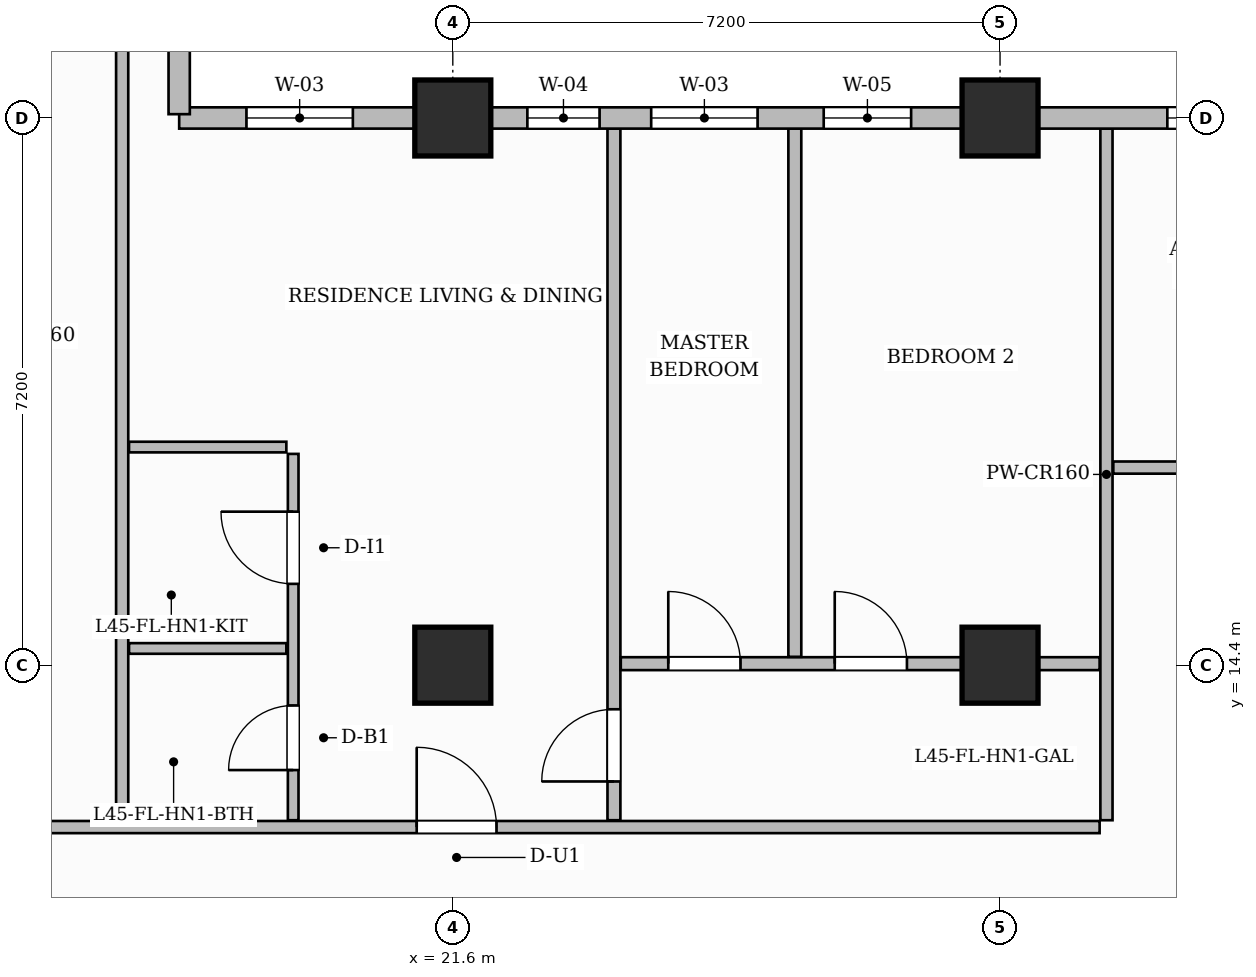
"""IFC4 building model, lengths in metres.
Left out: names, types, materials, properties, quantities, classifications, styles, units other than length and angle.
Written with IfcOpenShell. Run it as: python <this file> out.ifc"""

import sys

from ifc_helpers import new_model, si_unit, direction, frame, frame_2d, origin, origin_2d, place, context, subcontext, project, spatial, rectangle, extrude, source, transform, mapped, element, fill, save


model = new_model("IFC4")
c1 = context("Model", 3, precision=1e-05, world=origin(), true_north=direction((0.0, 1.0)))
c2 = subcontext(c1, "Body", "Model", "MODEL_VIEW")
j1 = project(units=[si_unit("LENGTHUNIT", "METRE"), si_unit("PLANEANGLEUNIT", "RADIAN")], contexts=[c1])
p1 = place(None, origin())
s1 = spatial("IfcSite", under=j1, at=p1, CompositionType="ELEMENT")
p2 = place(p1, origin())
s2 = spatial("IfcBuilding", under=s1, at=p2, CompositionType="ELEMENT")
p3 = place(p2, frame((0.0, 0.0, 181.1)))
s3 = spatial("IfcBuildingStorey", under=s2, at=p3, CompositionType="ELEMENT", Elevation=181.1)
m1 = source(origin(), c2, "Body", "SweptSolid", [
    extrude(rectangle(XDim=1.0, YDim=1.0, at=origin_2d()), origin(), (0.0, 0.0, 1.0), 3.85),
])
for number, where, z_axis, x_axis in (
    (1, (21.6, 14.4, 0.0), (0.0, 0.0, 1.0), (1.0, 0.0, 0.0)),
    (2, (21.6, 21.6, 0.0), (0.0, 0.0, 1.0), (1.0, 0.0, 0.0)),
    (3, (28.8, 14.4, 0.0), (0.0, 0.0, 1.0), (1.0, 0.0, 0.0)),
    (4, (28.8, 21.6, 0.0), (0.0, 0.0, 1.0), (1.0, 0.0, 0.0)),
):
    element("IfcColumn", number, at=place(p3, frame(where, z_axis=z_axis, x_axis=x_axis)), inside=s3, PredefinedType="COLUMN", context=c2, shape_type="MappedRepresentation", body=[
        mapped(m1, transform((0.0, 0.0, 0.0), scale=1.0)),
    ])
p4 = place(p3, frame((14.548, 12.27, 0.0), z_axis=(0.0, 0.0, 1.0), x_axis=(1.0, 0.0, 0.0)))
e5 = element("IfcWall", 5, at=p4, inside=s3, PredefinedType="PARTITIONING", context=c2, shape_type="SweptSolid", body=[
    extrude(rectangle(XDim=15.562, YDim=0.16, at=frame_2d((7.781, 0.0))), origin(), (0.0, 0.0, 1.0), 3.6),
])
p5 = place(p4, frame((6.577, 0.0, 0.0)))
e6 = element("IfcOpeningElement", 6, at=p5, cuts=e5, PredefinedType="OPENING", context=c2, shape_type="SweptSolid", body=[
    extrude(rectangle(XDim=1.05, YDim=2.25, at=frame_2d((0.525, 1.125))), frame((0.0, 0.09, 0.0), z_axis=(0.0, -1.0, 0.0), x_axis=(1.0, 0.0, 0.0)), (0.0, 0.0, 1.0), 0.18),
])
p6 = place(p3, frame((30.2, 12.36, 0.0), z_axis=(0.0, 0.0, 1.0), x_axis=(0.0, 1.0, 0.0)))
e7 = element("IfcWall", 7, at=p6, inside=s3, PredefinedType="PARTITIONING", context=c2, shape_type="SweptSolid", body=[
    extrude(rectangle(XDim=9.1, YDim=0.16, at=frame_2d((4.55, 0.0))), origin(), (0.0, 0.0, 1.0), 3.6),
])
p7 = place(p3, frame((30.29, 17.0, 0.0), z_axis=(0.0, 0.0, 1.0), x_axis=(1.0, 0.0, 0.0)))
e8 = element("IfcWall", 8, at=p7, inside=s3, PredefinedType="PARTITIONING", context=c2, shape_type="SweptSolid", body=[
    extrude(rectangle(XDim=19.37, YDim=0.16, at=frame_2d((9.685, 0.0))), origin(), (0.0, 0.0, 1.0), 3.6),
])
p8 = place(p7, frame((1.185, 0.0, 0.0)))
e9 = element("IfcOpeningElement", 9, at=p8, cuts=e8, PredefinedType="OPENING", context=c2, shape_type="SweptSolid", body=[
    extrude(rectangle(XDim=0.85, YDim=2.1, at=frame_2d((0.425, 1.05))), frame((0.0, 0.09, 0.0), z_axis=(0.0, -1.0, 0.0), x_axis=(1.0, 0.0, 0.0)), (0.0, 0.0, 1.0), 0.18),
])
p9 = place(p7, frame((6.66, 0.0, 0.0)))
e10 = element("IfcOpeningElement", 10, at=p9, cuts=e8, PredefinedType="OPENING", context=c2, shape_type="SweptSolid", body=[
    extrude(rectangle(XDim=0.9, YDim=2.15, at=frame_2d((0.45, 1.075))), frame((0.0, 0.09, 0.0), z_axis=(0.0, -1.0, 0.0), x_axis=(1.0, 0.0, 0.0)), (0.0, 0.0, 1.0), 0.18),
])
p10 = place(p7, frame((14.46, 0.0, 0.0)))
e11 = element("IfcOpeningElement", 11, at=p10, cuts=e8, PredefinedType="OPENING", context=c2, shape_type="SweptSolid", body=[
    extrude(rectangle(XDim=1.4, YDim=2.35, at=frame_2d((0.7, 1.175))), frame((0.0, 0.09, 0.0), z_axis=(0.0, -1.0, 0.0), x_axis=(1.0, 0.0, 0.0)), (0.0, 0.0, 1.0), 0.18),
])
p11 = place(p3, frame((17.25, 12.36, 0.0), z_axis=(0.0, 0.0, 1.0), x_axis=(0.0, 1.0, 0.0)))
e12 = element("IfcWall", 12, at=p11, inside=s3, PredefinedType="PARTITIONING", context=c2, shape_type="SweptSolid", body=[
    extrude(rectangle(XDim=12.75, YDim=0.16, at=frame_2d((6.375, 0.0))), origin(), (0.0, 0.0, 1.0), 3.6),
])
p12 = place(p3, frame((19.5, 12.36, 0.0), z_axis=(0.0, 0.0, 1.0), x_axis=(0.0, 1.0, 0.0)))
e13 = element("IfcWall", 13, at=p12, inside=s3, PredefinedType="PARTITIONING", context=c2, shape_type="SweptSolid", body=[
    extrude(rectangle(XDim=4.82, YDim=0.14, at=frame_2d((2.41, 0.0))), origin(), (0.0, 0.0, 1.0), 3.6),
])
p13 = place(p12, frame((0.66, 0.0, 0.0)))
e14 = element("IfcOpeningElement", 14, at=p13, cuts=e13, PredefinedType="OPENING", context=c2, shape_type="SweptSolid", body=[
    extrude(rectangle(XDim=0.85, YDim=2.1, at=frame_2d((0.425, 1.05))), frame((0.0, 0.08, 0.0), z_axis=(0.0, -1.0, 0.0), x_axis=(1.0, 0.0, 0.0)), (0.0, 0.0, 1.0), 0.16),
])
p14 = place(p12, frame((3.11, 0.0, 0.0)))
e15 = element("IfcOpeningElement", 15, at=p14, cuts=e13, PredefinedType="OPENING", context=c2, shape_type="SweptSolid", body=[
    extrude(rectangle(XDim=0.95, YDim=2.15, at=frame_2d((0.475, 1.075))), frame((0.0, 0.08, 0.0), z_axis=(0.0, -1.0, 0.0), x_axis=(1.0, 0.0, 0.0)), (0.0, 0.0, 1.0), 0.16),
])
p15 = place(p3, frame((17.34, 14.62, 0.0), z_axis=(0.0, 0.0, 1.0), x_axis=(1.0, 0.0, 0.0)))
e16 = element("IfcWall", 16, at=p15, inside=s3, PredefinedType="PARTITIONING", context=c2, shape_type="SweptSolid", body=[
    extrude(rectangle(XDim=2.07, YDim=0.14, at=frame_2d((1.035, 0.0))), origin(), (0.0, 0.0, 1.0), 3.085),
])
p16 = place(p3, frame((17.34, 17.27, 0.0), z_axis=(0.0, 0.0, 1.0), x_axis=(1.0, 0.0, 0.0)))
e17 = element("IfcWall", 17, at=p16, inside=s3, PredefinedType="PARTITIONING", context=c2, shape_type="SweptSolid", body=[
    extrude(rectangle(XDim=2.07, YDim=0.14, at=frame_2d((1.035, 0.0))), origin(), (0.0, 0.0, 1.0), 3.6),
])
p17 = place(p3, frame((23.72, 12.36, 0.0), z_axis=(0.0, 0.0, 1.0), x_axis=(0.0, 1.0, 0.0)))
e18 = element("IfcWall", 18, at=p17, inside=s3, PredefinedType="PARTITIONING", context=c2, shape_type="SweptSolid", body=[
    extrude(rectangle(XDim=9.1, YDim=0.17, at=frame_2d((4.55, 0.0))), origin(), (0.0, 0.0, 1.0), 3.6),
])
p18 = place(p17, frame((0.51, 0.0, 0.0)))
e19 = element("IfcOpeningElement", 19, at=p18, cuts=e18, PredefinedType="OPENING", context=c2, shape_type="SweptSolid", body=[
    extrude(rectangle(XDim=0.95, YDim=2.15, at=frame_2d((0.475, 1.075))), frame((0.0, 0.095, 0.0), z_axis=(0.0, -1.0, 0.0), x_axis=(1.0, 0.0, 0.0)), (0.0, 0.0, 1.0), 0.19),
])
p19 = place(p3, frame((23.81, 14.42, 0.0), z_axis=(0.0, 0.0, 1.0), x_axis=(1.0, 0.0, 0.0)))
e20 = element("IfcWall", 20, at=p19, inside=s3, PredefinedType="PARTITIONING", context=c2, shape_type="SweptSolid", body=[
    extrude(rectangle(XDim=6.3, YDim=0.17, at=frame_2d((3.15, 0.0))), origin(), (0.0, 0.0, 1.0), 2.985),
])
p20 = place(p19, frame((0.625, 0.0, 0.0)))
e21 = element("IfcOpeningElement", 21, at=p20, cuts=e20, PredefinedType="OPENING", context=c2, shape_type="SweptSolid", body=[
    extrude(rectangle(XDim=0.95, YDim=2.15, at=frame_2d((0.475, 1.075))), frame((0.0, 0.095, 0.0), z_axis=(0.0, -1.0, 0.0), x_axis=(1.0, 0.0, 0.0)), (0.0, 0.0, 1.0), 0.19),
])
p21 = place(p19, frame((2.815, 0.0, 0.0)))
e22 = element("IfcOpeningElement", 22, at=p21, cuts=e20, PredefinedType="OPENING", context=c2, shape_type="SweptSolid", body=[
    extrude(rectangle(XDim=0.95, YDim=2.15, at=frame_2d((0.475, 1.075))), frame((0.0, 0.095, 0.0), z_axis=(0.0, -1.0, 0.0), x_axis=(1.0, 0.0, 0.0)), (0.0, 0.0, 1.0), 0.19),
])
p22 = place(p3, frame((26.1, 14.51, 0.0), z_axis=(0.0, 0.0, 1.0), x_axis=(0.0, 1.0, 0.0)))
e23 = element("IfcWall", 23, at=p22, inside=s3, PredefinedType="PARTITIONING", context=c2, shape_type="SweptSolid", body=[
    extrude(rectangle(XDim=6.95, YDim=0.17, at=frame_2d((3.475, 0.0))), origin(), (0.0, 0.0, 1.0), 3.6),
])
p23 = place(p3, frame((18.0, 21.6, 0.0), z_axis=(0.0, 0.0, 1.0), x_axis=(1.0, 0.0, 0.0)))
e24 = element("IfcWall", 24, at=p23, inside=s3, PredefinedType="SOLIDWALL", context=c2, shape_type="SweptSolid", body=[
    extrude(rectangle(XDim=31.8, YDim=0.28, at=frame_2d((15.9, 0.0))), origin(), (0.0, 0.0, 1.0), 3.085),
])
p24 = place(p23, frame((0.885, 0.0, 0.8)))
e25 = element("IfcOpeningElement", 25, at=p24, cuts=e24, PredefinedType="OPENING", context=c2, shape_type="SweptSolid", body=[
    extrude(rectangle(XDim=1.4, YDim=1.85, at=frame_2d((0.7, 0.925))), frame((0.0, 0.15, 0.0), z_axis=(0.0, -1.0, 0.0), x_axis=(1.0, 0.0, 0.0)), (0.0, 0.0, 1.0), 0.3),
])
p25 = place(p23, frame((4.581, 0.0, 0.8)))
e26 = element("IfcOpeningElement", 26, at=p25, cuts=e24, PredefinedType="OPENING", context=c2, shape_type="SweptSolid", body=[
    extrude(rectangle(XDim=0.95, YDim=1.75, at=frame_2d((0.475, 0.875))), frame((0.0, 0.15, 0.0), z_axis=(0.0, -1.0, 0.0), x_axis=(1.0, 0.0, 0.0)), (0.0, 0.0, 1.0), 0.3),
])
p26 = place(p23, frame((6.21, 0.0, 0.8)))
e27 = element("IfcOpeningElement", 27, at=p26, cuts=e24, PredefinedType="OPENING", context=c2, shape_type="SweptSolid", body=[
    extrude(rectangle(XDim=1.4, YDim=1.85, at=frame_2d((0.7, 0.925))), frame((0.0, 0.15, 0.0), z_axis=(0.0, -1.0, 0.0), x_axis=(1.0, 0.0, 0.0)), (0.0, 0.0, 1.0), 0.3),
])
p27 = place(p23, frame((8.48, 0.0, 0.8)))
e28 = element("IfcOpeningElement", 28, at=p27, cuts=e24, PredefinedType="OPENING", context=c2, shape_type="SweptSolid", body=[
    extrude(rectangle(XDim=1.15, YDim=1.8, at=frame_2d((0.575, 0.9))), frame((0.0, 0.15, 0.0), z_axis=(0.0, -1.0, 0.0), x_axis=(1.0, 0.0, 0.0)), (0.0, 0.0, 1.0), 0.3),
])
p28 = place(p23, frame((13.001, 0.0, 0.8)))
e29 = element("IfcOpeningElement", 29, at=p28, cuts=e24, PredefinedType="OPENING", context=c2, shape_type="SweptSolid", body=[
    extrude(rectangle(XDim=1.8, YDim=1.85, at=frame_2d((0.9, 0.925))), frame((0.0, 0.15, 0.0), z_axis=(0.0, -1.0, 0.0), x_axis=(1.0, 0.0, 0.0)), (0.0, 0.0, 1.0), 0.3),
])
p29 = place(p23, frame((18.123, 0.0, 0.8)))
e30 = element("IfcOpeningElement", 30, at=p29, cuts=e24, PredefinedType="OPENING", context=c2, shape_type="SweptSolid", body=[
    extrude(rectangle(XDim=1.8, YDim=1.85, at=frame_2d((0.9, 0.925))), frame((0.0, 0.15, 0.0), z_axis=(0.0, -1.0, 0.0), x_axis=(1.0, 0.0, 0.0)), (0.0, 0.0, 1.0), 0.3),
])
p30 = place(p23, frame((20.869, 0.0, 0.8)))
e31 = element("IfcOpeningElement", 31, at=p30, cuts=e24, PredefinedType="OPENING", context=c2, shape_type="SweptSolid", body=[
    extrude(rectangle(XDim=1.8, YDim=1.85, at=frame_2d((0.9, 0.925))), frame((0.0, 0.15, 0.0), z_axis=(0.0, -1.0, 0.0), x_axis=(1.0, 0.0, 0.0)), (0.0, 0.0, 1.0), 0.3),
])
p31 = place(p23, frame((25.475, 0.0, 0.8)))
e32 = element("IfcOpeningElement", 32, at=p31, cuts=e24, PredefinedType="OPENING", context=c2, shape_type="SweptSolid", body=[
    extrude(rectangle(XDim=1.8, YDim=1.85, at=frame_2d((0.9, 0.925))), frame((0.0, 0.15, 0.0), z_axis=(0.0, -1.0, 0.0), x_axis=(1.0, 0.0, 0.0)), (0.0, 0.0, 1.0), 0.3),
])
p32 = place(p23, frame((28.525, 0.0, 0.8)))
e33 = element("IfcOpeningElement", 33, at=p32, cuts=e24, PredefinedType="OPENING", context=c2, shape_type="SweptSolid", body=[
    extrude(rectangle(XDim=1.8, YDim=1.85, at=frame_2d((0.9, 0.925))), frame((0.0, 0.15, 0.0), z_axis=(0.0, -1.0, 0.0), x_axis=(1.0, 0.0, 0.0)), (0.0, 0.0, 1.0), 0.3),
])
p33 = place(p3, frame((18.0, 21.65, 0.0), z_axis=(0.0, 0.0, 1.0), x_axis=(0.0, 1.0, 0.0)))
e34 = element("IfcWall", 34, at=p33, inside=s3, PredefinedType="SOLIDWALL", context=c2, shape_type="SweptSolid", body=[
    extrude(rectangle(XDim=25.1, YDim=0.28, at=frame_2d((12.55, 0.0))), origin(), (0.0, 0.0, 1.0), 3.6),
])
p34 = place(p33, frame((12.25, 0.0, 0.0)))
e35 = element("IfcOpeningElement", 35, at=p34, cuts=e34, PredefinedType="OPENING", context=c2, shape_type="SweptSolid", body=[
    extrude(rectangle(XDim=1.2, YDim=2.2, at=frame_2d((0.6, 1.1))), frame((0.0, 0.15, 0.0), z_axis=(0.0, -1.0, 0.0), x_axis=(1.0, 0.0, 0.0)), (0.0, 0.0, 1.0), 0.3),
])
p35 = place(p33, frame((1.89, 0.0, 0.8)))
e36 = element("IfcOpeningElement", 36, at=p35, cuts=e34, PredefinedType="OPENING", context=c2, shape_type="SweptSolid", body=[
    extrude(rectangle(XDim=1.8, YDim=1.85, at=frame_2d((0.9, 0.925))), frame((0.0, 0.15, 0.0), z_axis=(0.0, -1.0, 0.0), x_axis=(1.0, 0.0, 0.0)), (0.0, 0.0, 1.0), 0.3),
])
p36 = place(p33, frame((6.63, 0.0, 0.8)))
e37 = element("IfcOpeningElement", 37, at=p36, cuts=e34, PredefinedType="OPENING", context=c2, shape_type="SweptSolid", body=[
    extrude(rectangle(XDim=1.8, YDim=1.85, at=frame_2d((0.9, 0.925))), frame((0.0, 0.15, 0.0), z_axis=(0.0, -1.0, 0.0), x_axis=(1.0, 0.0, 0.0)), (0.0, 0.0, 1.0), 0.3),
])
p37 = place(p33, frame((14.55, 0.0, 0.8)))
e38 = element("IfcOpeningElement", 38, at=p37, cuts=e34, PredefinedType="OPENING", context=c2, shape_type="SweptSolid", body=[
    extrude(rectangle(XDim=1.8, YDim=1.85, at=frame_2d((0.9, 0.925))), frame((0.0, 0.15, 0.0), z_axis=(0.0, -1.0, 0.0), x_axis=(1.0, 0.0, 0.0)), (0.0, 0.0, 1.0), 0.3),
])
p38 = place(p33, frame((19.275, 0.0, 0.8)))
e39 = element("IfcOpeningElement", 39, at=p38, cuts=e34, PredefinedType="OPENING", context=c2, shape_type="SweptSolid", body=[
    extrude(rectangle(XDim=1.8, YDim=1.85, at=frame_2d((0.9, 0.925))), frame((0.0, 0.15, 0.0), z_axis=(0.0, -1.0, 0.0), x_axis=(1.0, 0.0, 0.0)), (0.0, 0.0, 1.0), 0.3),
])
p39 = place(p33, frame((22.025, 0.0, 0.8)))
e40 = element("IfcOpeningElement", 40, at=p39, cuts=e34, PredefinedType="OPENING", context=c2, shape_type="SweptSolid", body=[
    extrude(rectangle(XDim=1.8, YDim=1.85, at=frame_2d((0.9, 0.925))), frame((0.0, 0.15, 0.0), z_axis=(0.0, -1.0, 0.0), x_axis=(1.0, 0.0, 0.0)), (0.0, 0.0, 1.0), 0.3),
])
m2 = source(origin(), c2, "Body", "SweptSolid", [
    extrude(rectangle(XDim=0.85, YDim=2.1, at=frame_2d((0.425, 1.05))), frame((0.0, 0.025, 0.0), z_axis=(0.0, -1.0, 0.0), x_axis=(1.0, 0.0, 0.0)), (0.0, 0.0, 1.0), 0.05),
])
p40 = place(p13, origin())
e41 = element("IfcDoor", 41, at=p40, inside=s3, OperationType="SINGLE_SWING_LEFT", PredefinedType="DOOR", context=c2, shape_type="MappedRepresentation", body=[
    mapped(m2, transform((0.0, 0.0, 0.0), scale=1.0)),
])
fill(e14, e41)
m3 = source(origin(), c2, "Body", "SweptSolid", [
    extrude(rectangle(XDim=0.95, YDim=2.15, at=frame_2d((0.475, 1.075))), frame((0.0, 0.025, 0.0), z_axis=(0.0, -1.0, 0.0), x_axis=(1.0, 0.0, 0.0)), (0.0, 0.0, 1.0), 0.05),
])
p41 = place(p14, origin())
e42 = element("IfcDoor", 42, at=p41, inside=s3, OperationType="SINGLE_SWING_RIGHT", PredefinedType="DOOR", context=c2, shape_type="MappedRepresentation", body=[
    mapped(m3, transform((0.0, 0.0, 0.0), scale=1.0)),
])
fill(e15, e42)
m4 = source(origin(), c2, "Body", "SweptSolid", [
    extrude(rectangle(XDim=1.05, YDim=2.25, at=frame_2d((0.525, 1.125))), frame((0.0, 0.025, 0.0), z_axis=(0.0, -1.0, 0.0), x_axis=(1.0, 0.0, 0.0)), (0.0, 0.0, 1.0), 0.05),
])
p42 = place(p5, origin())
e43 = element("IfcDoor", 43, at=p42, inside=s3, OperationType="SINGLE_SWING_LEFT", PredefinedType="DOOR", context=c2, shape_type="MappedRepresentation", body=[
    mapped(m4, transform((0.0, 0.0, 0.0), scale=1.0)),
])
fill(e6, e43)
p43 = place(p18, origin())
e44 = element("IfcDoor", 44, at=p43, inside=s3, OperationType="SINGLE_SWING_LEFT", PredefinedType="DOOR", context=c2, shape_type="MappedRepresentation", body=[
    mapped(m3, transform((0.0, 0.0, 0.0), scale=1.0)),
])
fill(e19, e44)
p44 = place(p20, origin())
e45 = element("IfcDoor", 45, at=p44, inside=s3, OperationType="SINGLE_SWING_LEFT", PredefinedType="DOOR", context=c2, shape_type="MappedRepresentation", body=[
    mapped(m3, transform((0.0, 0.0, 0.0), scale=1.0)),
])
fill(e21, e45)
p45 = place(p21, origin())
e46 = element("IfcDoor", 46, at=p45, inside=s3, OperationType="SINGLE_SWING_LEFT", PredefinedType="DOOR", context=c2, shape_type="MappedRepresentation", body=[
    mapped(m3, transform((0.0, 0.0, 0.0), scale=1.0)),
])
fill(e22, e46)
m5 = source(origin(), c2, "Body", "SweptSolid", [
    extrude(rectangle(XDim=1.4, YDim=1.85, at=frame_2d((0.7, 0.925))), frame((0.0, 0.03, 0.0), z_axis=(0.0, -1.0, 0.0), x_axis=(1.0, 0.0, 0.0)), (0.0, 0.0, 1.0), 0.06),
])
p46 = place(p24, origin())
e47 = element("IfcWindow", 47, at=p46, inside=s3, PartitioningType="SINGLE_PANEL", PredefinedType="WINDOW", context=c2, shape_type="MappedRepresentation", body=[
    mapped(m5, transform((0.0, 0.0, 0.0), scale=1.0)),
])
fill(e25, e47)
m6 = source(origin(), c2, "Body", "SweptSolid", [
    extrude(rectangle(XDim=0.95, YDim=1.75, at=frame_2d((0.475, 0.875))), frame((0.0, 0.03, 0.0), z_axis=(0.0, -1.0, 0.0), x_axis=(1.0, 0.0, 0.0)), (0.0, 0.0, 1.0), 0.06),
])
p47 = place(p25, origin())
e48 = element("IfcWindow", 48, at=p47, inside=s3, PartitioningType="SINGLE_PANEL", PredefinedType="WINDOW", context=c2, shape_type="MappedRepresentation", body=[
    mapped(m6, transform((0.0, 0.0, 0.0), scale=1.0)),
])
fill(e26, e48)
p48 = place(p26, origin())
e49 = element("IfcWindow", 49, at=p48, inside=s3, PartitioningType="SINGLE_PANEL", PredefinedType="WINDOW", context=c2, shape_type="MappedRepresentation", body=[
    mapped(m5, transform((0.0, 0.0, 0.0), scale=1.0)),
])
fill(e27, e49)
m7 = source(origin(), c2, "Body", "SweptSolid", [
    extrude(rectangle(XDim=1.15, YDim=1.8, at=frame_2d((0.575, 0.9))), frame((0.0, 0.03, 0.0), z_axis=(0.0, -1.0, 0.0), x_axis=(1.0, 0.0, 0.0)), (0.0, 0.0, 1.0), 0.06),
])
p49 = place(p27, origin())
e50 = element("IfcWindow", 50, at=p49, inside=s3, PartitioningType="SINGLE_PANEL", PredefinedType="WINDOW", context=c2, shape_type="MappedRepresentation", body=[
    mapped(m7, transform((0.0, 0.0, 0.0), scale=1.0)),
])
fill(e28, e50)
m8 = source(origin(), c2, "Body", "SweptSolid", [
    extrude(rectangle(XDim=1.8, YDim=1.85, at=frame_2d((0.9, 0.925))), frame((0.0, 0.03, 0.0), z_axis=(0.0, -1.0, 0.0), x_axis=(1.0, 0.0, 0.0)), (0.0, 0.0, 1.0), 0.06),
])
p50 = place(p28, origin())
e51 = element("IfcWindow", 51, at=p50, inside=s3, PartitioningType="DOUBLE_PANEL_VERTICAL", PredefinedType="WINDOW", context=c2, shape_type="MappedRepresentation", body=[
    mapped(m8, transform((0.0, 0.0, 0.0), scale=1.0)),
])
fill(e29, e51)
save(model, sys.argv[1])
